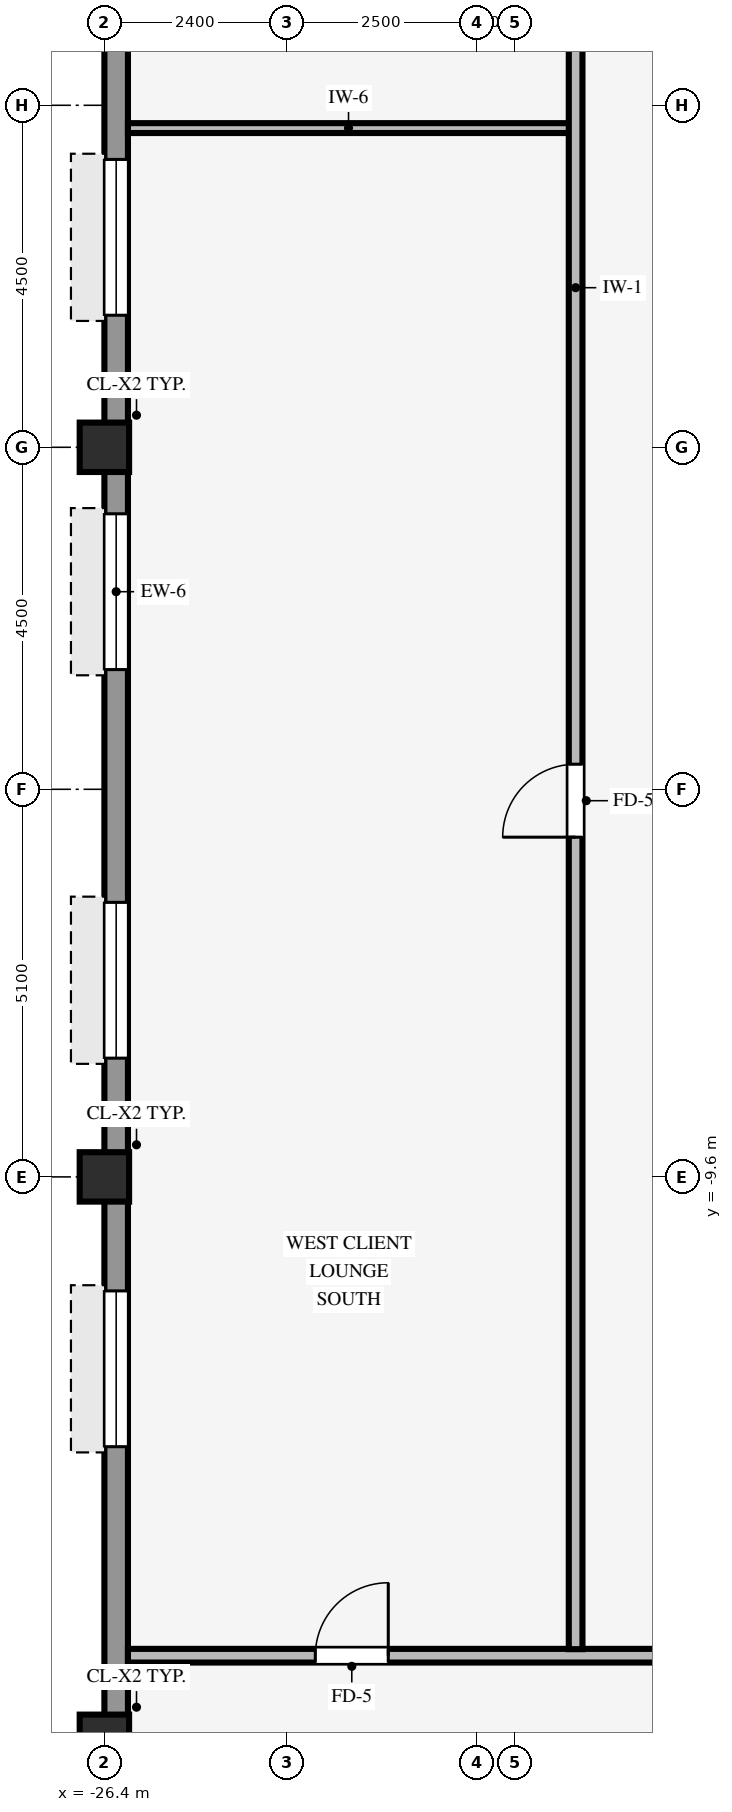
"""IFC4 building model, lengths in metres.
Left out: names, types, materials, properties, quantities, classifications, styles, units other than length and angle.
Written with IfcOpenShell. Run it as: python <this file> out.ifc"""

import sys

from ifc_helpers import new_model, si_unit, direction, frame, frame_2d, origin, origin_2d, place, context, subcontext, project, spatial, rectangle, hollow_rectangle, extrude, source, transform, mapped, element, fill, save


model = new_model("IFC4")
c1 = context("Model", 3, precision=1e-05, world=origin(), true_north=direction((0.0, 1.0)))
c2 = subcontext(c1, "Body", "Model", "MODEL_VIEW")
j1 = project(units=[si_unit("LENGTHUNIT", "METRE"), si_unit("PLANEANGLEUNIT", "RADIAN")], contexts=[c1])
p1 = place(None, origin())
s1 = spatial("IfcSite", under=j1, at=p1, CompositionType="ELEMENT")
p2 = place(p1, origin())
s2 = spatial("IfcBuilding", under=s1, at=p2, CompositionType="ELEMENT")
p3 = place(p2, frame((0.0, 0.0, 182.25)))
s3 = spatial("IfcBuildingStorey", under=s2, at=p3, CompositionType="ELEMENT", Elevation=182.25)
for number, where, z_axis, x_axis in (
    (1, (-26.4, -17.0, 0.0), (0.0, 0.0, 1.0), (1.0, 0.0, 0.0)),
    (2, (-26.4, -9.6, 0.0), (0.0, 0.0, 1.0), (1.0, 0.0, 0.0)),
    (3, (-26.4, 0.0, 0.0), (0.0, 0.0, 1.0), (1.0, 0.0, 0.0)),
):
    element("IfcColumn", number, at=place(p3, frame(where, z_axis=z_axis, x_axis=x_axis)), inside=s3, PredefinedType="COLUMN", context=c2, shape_type="SweptSolid", body=[
        extrude(hollow_rectangle(XDim=0.65, YDim=0.65, WallThickness=0.04, InnerFilletRadius=0.04, OuterFilletRadius=0.08, at=origin_2d()), origin(), (0.0, 0.0, 1.0), 3.25),
    ])
p4 = place(p3, frame((-26.245, -20.794, 0.0), z_axis=(0.0, 0.0, 1.0), x_axis=(0.0, 1.0, 0.0)))
e4 = element("IfcWall", 4, at=p4, inside=s3, PredefinedType="STANDARD", context=c2, shape_type="SweptSolid", body=[
    extrude(rectangle(XDim=37.788, YDim=0.31, at=frame_2d((18.894, 0.0))), origin(), (0.0, 0.0, 1.0), 2.585),
])
p5 = place(p4, frame((7.644, 0.0, 0.8)))
e5 = element("IfcOpeningElement", 5, at=p5, cuts=e4, PredefinedType="OPENING", context=c2, shape_type="SweptSolid", body=[
    extrude(rectangle(XDim=2.05, YDim=1.52, at=frame_2d((1.025, 0.76))), frame((0.0, 0.165, 0.0), z_axis=(0.0, -1.0, 0.0), x_axis=(1.0, 0.0, 0.0)), (0.0, 0.0, 1.0), 0.33),
])
p6 = place(p4, frame((12.756, 0.0, 0.8)))
e6 = element("IfcOpeningElement", 6, at=p6, cuts=e4, PredefinedType="OPENING", context=c2, shape_type="SweptSolid", body=[
    extrude(rectangle(XDim=2.05, YDim=1.52, at=frame_2d((1.025, 0.76))), frame((0.0, 0.165, 0.0), z_axis=(0.0, -1.0, 0.0), x_axis=(1.0, 0.0, 0.0)), (0.0, 0.0, 1.0), 0.33),
])
p7 = place(p4, frame((17.869, 0.0, 0.8)))
e7 = element("IfcOpeningElement", 7, at=p7, cuts=e4, PredefinedType="OPENING", context=c2, shape_type="SweptSolid", body=[
    extrude(rectangle(XDim=2.05, YDim=1.52, at=frame_2d((1.025, 0.76))), frame((0.0, 0.165, 0.0), z_axis=(0.0, -1.0, 0.0), x_axis=(1.0, 0.0, 0.0)), (0.0, 0.0, 1.0), 0.33),
])
p8 = place(p4, frame((22.531, 0.0, 0.8)))
e8 = element("IfcOpeningElement", 8, at=p8, cuts=e4, PredefinedType="OPENING", context=c2, shape_type="SweptSolid", body=[
    extrude(rectangle(XDim=2.05, YDim=1.52, at=frame_2d((1.025, 0.76))), frame((0.0, 0.165, 0.0), z_axis=(0.0, -1.0, 0.0), x_axis=(1.0, 0.0, 0.0)), (0.0, 0.0, 1.0), 0.33),
])
p9 = place(p4, frame((27.194, 0.0, 0.8)))
e9 = element("IfcOpeningElement", 9, at=p9, cuts=e4, PredefinedType="OPENING", context=c2, shape_type="SweptSolid", body=[
    extrude(rectangle(XDim=2.05, YDim=1.52, at=frame_2d((1.025, 0.76))), frame((0.0, 0.165, 0.0), z_axis=(0.0, -1.0, 0.0), x_axis=(1.0, 0.0, 0.0)), (0.0, 0.0, 1.0), 0.33),
])
p10 = place(p4, frame((33.207, 0.0, 0.8)))
e10 = element("IfcOpeningElement", 10, at=p10, cuts=e4, PredefinedType="OPENING", context=c2, shape_type="SweptSolid", body=[
    extrude(rectangle(XDim=2.05, YDim=1.52, at=frame_2d((1.025, 0.76))), frame((0.0, 0.165, 0.0), z_axis=(0.0, -1.0, 0.0), x_axis=(1.0, 0.0, 0.0)), (0.0, 0.0, 1.0), 0.33),
])
p11 = place(p3, frame((-26.09, -15.9, 0.0), z_axis=(0.0, 0.0, 1.0), x_axis=(1.0, 0.0, 0.0)))
e11 = element("IfcWall", 11, at=p11, inside=s3, PredefinedType="PARTITIONING", context=c2, shape_type="SweptSolid", body=[
    extrude(rectangle(XDim=48.38, YDim=0.18, at=frame_2d((24.19, 0.0))), origin(), (0.0, 0.0, 1.0), 3.24),
])
p12 = place(p11, frame((40.51, 0.0, 0.0)))
e12 = element("IfcOpeningElement", 12, at=p12, cuts=e11, PredefinedType="OPENING", context=c2, shape_type="SweptSolid", body=[
    extrude(rectangle(XDim=0.96, YDim=2.1, at=frame_2d((0.48, 1.05))), frame((0.0, 0.1, 0.0), z_axis=(0.0, -1.0, 0.0), x_axis=(1.0, 0.0, 0.0)), (0.0, 0.0, 1.0), 0.2),
])
p13 = place(p11, frame((19.995, 0.0, 0.0)))
e13 = element("IfcOpeningElement", 13, at=p13, cuts=e11, PredefinedType="OPENING", context=c2, shape_type="SweptSolid", body=[
    extrude(rectangle(XDim=0.96, YDim=2.1, at=frame_2d((0.48, 1.05))), frame((0.0, 0.1, 0.0), z_axis=(0.0, -1.0, 0.0), x_axis=(1.0, 0.0, 0.0)), (0.0, 0.0, 1.0), 0.2),
])
p14 = place(p11, frame((28.45, 0.0, 0.0)))
e14 = element("IfcOpeningElement", 14, at=p14, cuts=e11, PredefinedType="OPENING", context=c2, shape_type="SweptSolid", body=[
    extrude(rectangle(XDim=0.96, YDim=2.1, at=frame_2d((0.48, 1.05))), frame((0.0, 0.1, 0.0), z_axis=(0.0, -1.0, 0.0), x_axis=(1.0, 0.0, 0.0)), (0.0, 0.0, 1.0), 0.2),
])
p15 = place(p11, frame((11.605, 0.0, 0.0)))
e15 = element("IfcOpeningElement", 15, at=p15, cuts=e11, PredefinedType="OPENING", context=c2, shape_type="SweptSolid", body=[
    extrude(rectangle(XDim=0.96, YDim=2.1, at=frame_2d((0.48, 1.05))), frame((0.0, 0.1, 0.0), z_axis=(0.0, -1.0, 0.0), x_axis=(1.0, 0.0, 0.0)), (0.0, 0.0, 1.0), 0.2),
])
p16 = place(p11, frame((2.465, 0.0, 0.0)))
e16 = element("IfcOpeningElement", 16, at=p16, cuts=e11, PredefinedType="OPENING", context=c2, shape_type="SweptSolid", body=[
    extrude(rectangle(XDim=0.96, YDim=2.1, at=frame_2d((0.48, 1.05))), frame((0.0, 0.1, 0.0), z_axis=(0.0, -1.0, 0.0), x_axis=(1.0, 0.0, 0.0)), (0.0, 0.0, 1.0), 0.2),
])
p17 = place(p3, frame((-26.09, 4.2, 0.0), z_axis=(0.0, 0.0, 1.0), x_axis=(1.0, 0.0, 0.0)))
e17 = element("IfcWall", 17, at=p17, inside=s3, PredefinedType="PARTITIONING", context=c2, shape_type="SweptSolid", body=[
    extrude(rectangle(XDim=5.804, YDim=0.13, at=frame_2d((2.902, 0.0))), origin(), (0.0, 0.0, 1.0), 3.24),
])
p18 = place(p3, frame((-20.2, -15.814, 0.0), z_axis=(0.0, 0.0, 1.0), x_axis=(0.0, 1.0, 0.0)))
e18 = element("IfcWall", 18, at=p18, inside=s3, PredefinedType="PARTITIONING", context=c2, shape_type="SweptSolid", body=[
    extrude(rectangle(XDim=31.628, YDim=0.18, at=frame_2d((15.814, 0.0))), origin(), (0.0, 0.0, 1.0), 3.24),
])
p19 = place(p18, frame((10.684, 0.0, 0.0)))
e19 = element("IfcOpeningElement", 19, at=p19, cuts=e18, PredefinedType="OPENING", context=c2, shape_type="SweptSolid", body=[
    extrude(rectangle(XDim=0.96, YDim=2.1, at=frame_2d((0.48, 1.05))), frame((0.0, 0.1, 0.0), z_axis=(0.0, -1.0, 0.0), x_axis=(1.0, 0.0, 0.0)), (0.0, 0.0, 1.0), 0.2),
])
p20 = place(p18, frame((24.184, 0.0, 0.0)))
e20 = element("IfcOpeningElement", 20, at=p20, cuts=e18, PredefinedType="OPENING", context=c2, shape_type="SweptSolid", body=[
    extrude(rectangle(XDim=0.96, YDim=2.1, at=frame_2d((0.48, 1.05))), frame((0.0, 0.1, 0.0), z_axis=(0.0, -1.0, 0.0), x_axis=(1.0, 0.0, 0.0)), (0.0, 0.0, 1.0), 0.2),
])
m1 = source(origin(), c2, "Body", "SweptSolid", [
    extrude(rectangle(XDim=2.05, YDim=1.52, at=frame_2d((1.025, 0.76))), frame((0.0, 0.03, 0.0), z_axis=(0.0, -1.0, 0.0), x_axis=(1.0, 0.0, 0.0)), (0.0, 0.0, 1.0), 0.06),
])
p21 = place(p5, origin())
e21 = element("IfcWindow", 21, at=p21, inside=s3, PartitioningType="SINGLE_PANEL", PredefinedType="WINDOW", context=c2, shape_type="MappedRepresentation", body=[
    mapped(m1, transform((0.0, 0.0, 0.0), scale=1.0)),
])
fill(e5, e21)
p22 = place(p6, origin())
e22 = element("IfcWindow", 22, at=p22, inside=s3, PartitioningType="SINGLE_PANEL", PredefinedType="WINDOW", context=c2, shape_type="MappedRepresentation", body=[
    mapped(m1, transform((0.0, 0.0, 0.0), scale=1.0)),
])
fill(e6, e22)
p23 = place(p7, origin())
e23 = element("IfcWindow", 23, at=p23, inside=s3, PartitioningType="SINGLE_PANEL", PredefinedType="WINDOW", context=c2, shape_type="MappedRepresentation", body=[
    mapped(m1, transform((0.0, 0.0, 0.0), scale=1.0)),
])
fill(e7, e23)
p24 = place(p8, origin())
e24 = element("IfcWindow", 24, at=p24, inside=s3, PartitioningType="SINGLE_PANEL", PredefinedType="WINDOW", context=c2, shape_type="MappedRepresentation", body=[
    mapped(m1, transform((0.0, 0.0, 0.0), scale=1.0)),
])
fill(e8, e24)
m2 = source(origin(), c2, "Body", "SweptSolid", [
    extrude(rectangle(XDim=0.96, YDim=2.1, at=frame_2d((0.48, 1.05))), frame((0.0, 0.025, 0.0), z_axis=(0.0, -1.0, 0.0), x_axis=(1.0, 0.0, 0.0)), (0.0, 0.0, 1.0), 0.05),
])
p25 = place(p19, origin())
e25 = element("IfcDoor", 25, at=p25, inside=s3, OperationType="SINGLE_SWING_LEFT", PredefinedType="DOOR", context=c2, shape_type="MappedRepresentation", body=[
    mapped(m2, transform((0.0, 0.0, 0.0), scale=1.0)),
])
fill(e19, e25)
p26 = place(p16, origin())
e26 = element("IfcDoor", 26, at=p26, inside=s3, OperationType="SINGLE_SWING_RIGHT", PredefinedType="DOOR", context=c2, shape_type="MappedRepresentation", body=[
    mapped(m2, transform((0.0, 0.0, 0.0), scale=1.0)),
])
fill(e16, e26)
save(model, sys.argv[1])
